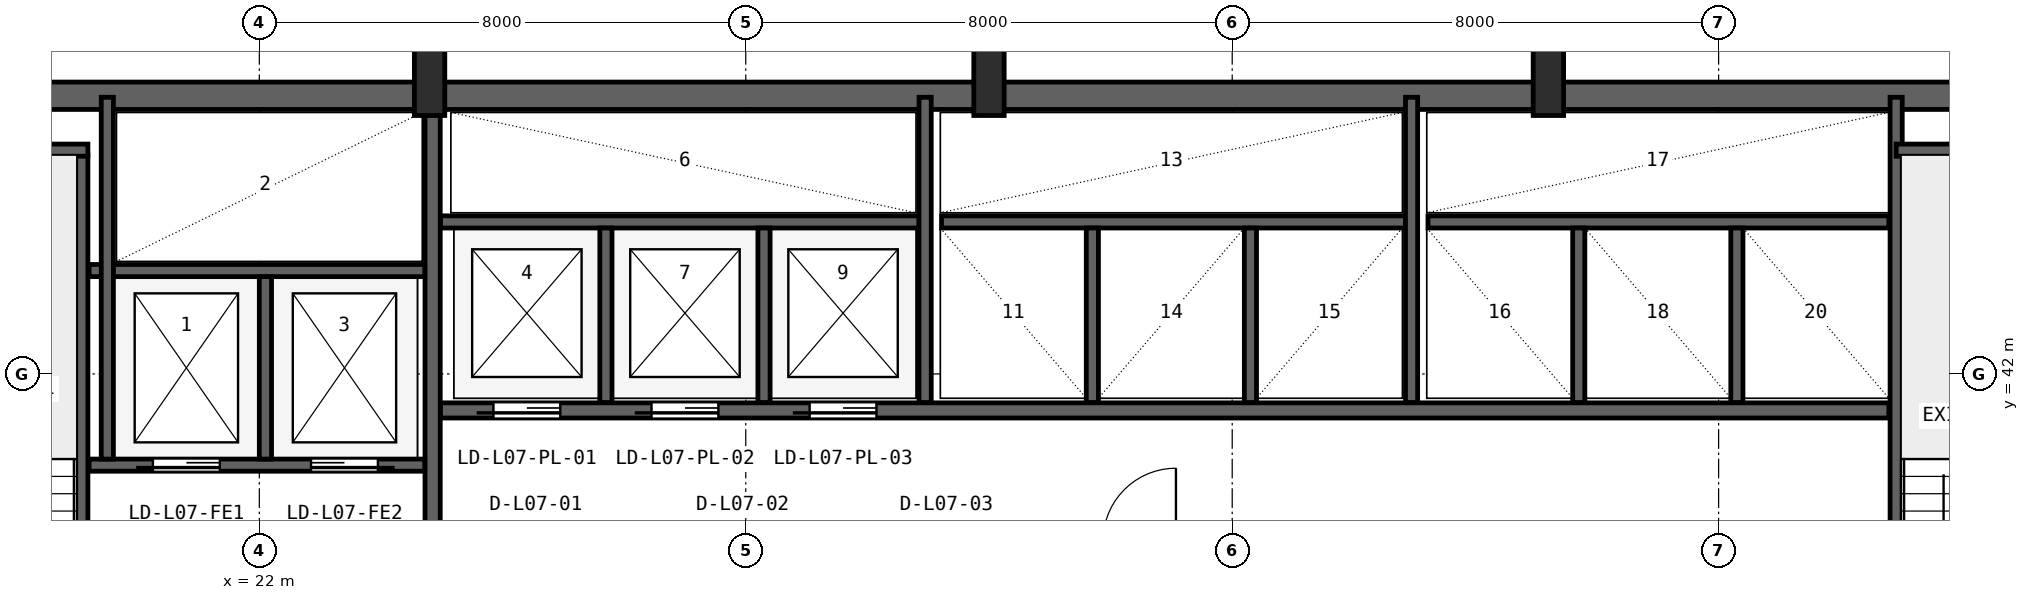
"""IFC4 building model, lengths in metres.
Left out: names, types, materials, properties, quantities, classifications, styles, units other than length and angle.
Written with IfcOpenShell. Run it as: python <this file> out.ifc"""

import sys

from ifc_helpers import new_model, si_unit, direction, frame, frame_2d, origin, origin_2d, place, context, subcontext, project, spatial, rectangle, i_section, extrude, source, transform, mapped, element, fill, save


model = new_model("IFC4")
c1 = context("Model", 3, precision=1e-05, world=origin(), true_north=direction((0.0, 1.0)))
c2 = subcontext(c1, "Body", "Model", "MODEL_VIEW")
j1 = project(units=[si_unit("LENGTHUNIT", "METRE"), si_unit("PLANEANGLEUNIT", "RADIAN")], contexts=[c1])
p1 = place(None, origin())
s1 = spatial("IfcSite", under=j1, at=p1, CompositionType="ELEMENT")
p2 = place(p1, origin())
s2 = spatial("IfcBuilding", under=s1, at=p2, CompositionType="ELEMENT")
p3 = place(p2, frame((0.0, 0.0, 35.4)))
s3 = spatial("IfcBuildingStorey", under=s2, at=p3, CompositionType="ELEMENT", Elevation=35.4)
p4 = place(p3, frame((15.6, 46.575, 0.0), z_axis=(0.0, 0.0, 1.0), x_axis=(1.0, 0.0, 0.0)))
e1 = element("IfcWall", 1, at=p4, inside=s3, PredefinedType="SHEAR", context=c2, shape_type="SweptSolid", body=[
    extrude(rectangle(XDim=36.8, YDim=0.45, at=frame_2d((18.4, 0.0))), origin(), (0.0, 0.0, 1.0), 3.65),
])
m1 = source(origin(), c2, "Body", "SweptSolid", [
    extrude(i_section(OverallWidth=0.5, OverallDepth=1.1, WebThickness=0.018, FlangeThickness=0.032, FilletRadius=0.018, at=origin_2d()), origin(), (0.0, 0.0, 1.0), 3.9),
])
for number, where, z_axis, x_axis in (
    (2, (24.8, 46.8, 0.0), (0.0, 0.0, 1.0), (1.0, 0.0, 0.0)),
    (3, (34.0, 46.8, 0.0), (0.0, 0.0, 1.0), (1.0, 0.0, 0.0)),
    (4, (43.2, 46.8, 0.0), (0.0, 0.0, 1.0), (1.0, 0.0, 0.0)),
):
    element("IfcColumn", number, at=place(p3, frame(where, z_axis=z_axis, x_axis=x_axis)), inside=s3, PredefinedType="COLUMN", context=c2, shape_type="MappedRepresentation", body=[
        mapped(m1, transform((0.0, 0.0, 0.0), x_axis=(1.0, 0.0, 0.0), y_axis=(0.0, 1.0, 0.0), z_axis=(0.0, 0.0, 1.0), scale=1.0)),
    ])
p5 = place(p3, frame((19.08, 35.95, 0.0), z_axis=(0.0, 0.0, 1.0), x_axis=(0.0, 1.0, 0.0)))
e5 = element("IfcWall", 5, at=p5, inside=s3, PredefinedType="SHEAR", context=c2, shape_type="SweptSolid", body=[
    extrude(rectangle(XDim=9.65, YDim=0.2, at=frame_2d((4.825, 0.0))), origin(), (0.0, 0.0, 1.0), 3.65),
])
p6 = place(p5, frame((0.25, 0.0, 0.0)))
e6 = element("IfcOpeningElement", 6, at=p6, cuts=e5, PredefinedType="OPENING", context=c2, shape_type="SweptSolid", body=[
    extrude(rectangle(XDim=0.95, YDim=2.1, at=frame_2d((0.475, 1.05))), frame((0.0, 0.11, 0.0), z_axis=(0.0, -1.0, 0.0), x_axis=(1.0, 0.0, 0.0)), (0.0, 0.0, 1.0), 0.22),
])
p7 = place(p3, frame((15.95, 45.68, 0.0), z_axis=(0.0, 0.0, 1.0), x_axis=(1.0, 0.0, 0.0)))
e7 = element("IfcWall", 7, at=p7, inside=s3, PredefinedType="SHEAR", context=c2, shape_type="SweptSolid", body=[
    extrude(rectangle(XDim=3.23, YDim=0.2, at=frame_2d((1.615, 0.0))), origin(), (0.0, 0.0, 1.0), 3.65),
])
p8 = place(p3, frame((24.85, 36.05, 0.0), z_axis=(0.0, 0.0, 1.0), x_axis=(0.0, 1.0, 0.0)))
e8 = element("IfcWall", 8, at=p8, inside=s3, PredefinedType="SHEAR", context=c2, shape_type="SweptSolid", body=[
    extrude(rectangle(XDim=10.45, YDim=0.25, at=frame_2d((5.225, 0.0))), origin(), (0.0, 0.0, 1.0), 3.65),
])
p9 = place(p3, frame((19.2, 40.5, 0.0), z_axis=(0.0, 0.0, 1.0), x_axis=(1.0, 0.0, 0.0)))
e9 = element("IfcWall", 9, at=p9, inside=s3, PredefinedType="SHEAR", context=c2, shape_type="SweptSolid", body=[
    extrude(rectangle(XDim=5.52, YDim=0.2, at=frame_2d((2.76, 0.0))), origin(), (0.0, 0.0, 1.0), 3.65),
])
p10 = place(p9, frame((1.05, 0.0, 0.0)))
e10 = element("IfcOpeningElement", 10, at=p10, cuts=e9, PredefinedType="OPENING", context=c2, shape_type="SweptSolid", body=[
    extrude(rectangle(XDim=1.1, YDim=2.18, at=frame_2d((0.55, 1.09))), frame((0.0, 0.11, 0.0), z_axis=(0.0, -1.0, 0.0), x_axis=(1.0, 0.0, 0.0)), (0.0, 0.0, 1.0), 0.22),
])
p11 = place(p9, frame((3.65, 0.0, 0.0)))
e11 = element("IfcOpeningElement", 11, at=p11, cuts=e9, PredefinedType="OPENING", context=c2, shape_type="SweptSolid", body=[
    extrude(rectangle(XDim=1.1, YDim=2.18, at=frame_2d((0.55, 1.09))), frame((0.0, 0.11, 0.0), z_axis=(0.0, -1.0, 0.0), x_axis=(1.0, 0.0, 0.0)), (0.0, 0.0, 1.0), 0.22),
])
p12 = place(p3, frame((19.2, 43.7, 0.0), z_axis=(0.0, 0.0, 1.0), x_axis=(1.0, 0.0, 0.0)))
e12 = element("IfcWall", 12, at=p12, inside=s3, PredefinedType="SHEAR", context=c2, shape_type="SweptSolid", body=[
    extrude(rectangle(XDim=5.52, YDim=0.2, at=frame_2d((2.76, 0.0))), origin(), (0.0, 0.0, 1.0), 3.65),
])
p13 = place(p3, frame((22.1, 40.6, 0.0), z_axis=(0.0, 0.0, 1.0), x_axis=(0.0, 1.0, 0.0)))
e13 = element("IfcWall", 13, at=p13, inside=s3, PredefinedType="SHEAR", context=c2, shape_type="SweptSolid", body=[
    extrude(rectangle(XDim=3.0, YDim=0.2, at=frame_2d((1.5, 0.0))), origin(), (0.0, 0.0, 1.0), 3.65),
])
p14 = place(p3, frame((19.5, 40.6, 0.0), z_axis=(0.0, 0.0, 1.0), x_axis=(0.0, 1.0, 0.0)))
e14 = element("IfcWall", 14, at=p14, inside=s3, PredefinedType="SHEAR", context=c2, shape_type="SweptSolid", body=[
    extrude(rectangle(XDim=5.95, YDim=0.2, at=frame_2d((2.975, 0.0))), origin(), (0.0, 0.0, 1.0), 3.65),
])
p15 = place(p3, frame((48.92, 36.05, 0.0), z_axis=(0.0, 0.0, 1.0), x_axis=(0.0, 1.0, 0.0)))
e15 = element("IfcWall", 15, at=p15, inside=s3, PredefinedType="SHEAR", context=c2, shape_type="SweptSolid", body=[
    extrude(rectangle(XDim=10.5, YDim=0.2, at=frame_2d((5.25, 0.0))), origin(), (0.0, 0.0, 1.0), 3.65),
])
p16 = place(p3, frame((48.92, 45.68, 0.0), z_axis=(0.0, 0.0, 1.0), x_axis=(1.0, 0.0, 0.0)))
e16 = element("IfcWall", 16, at=p16, inside=s3, PredefinedType="SHEAR", context=c2, shape_type="SweptSolid", body=[
    extrude(rectangle(XDim=3.18, YDim=0.2, at=frame_2d((1.59, 0.0))), origin(), (0.0, 0.0, 1.0), 3.65),
])
p17 = place(p3, frame((24.98, 41.4, 0.0), z_axis=(0.0, 0.0, 1.0), x_axis=(1.0, 0.0, 0.0)))
e17 = element("IfcWall", 17, at=p17, inside=s3, PredefinedType="SHEAR", context=c2, shape_type="SweptSolid", body=[
    extrude(rectangle(XDim=23.82, YDim=0.25, at=frame_2d((11.91, 0.0))), origin(), (0.0, 0.0, 1.0), 3.65),
])
p18 = place(p17, frame((0.87, 0.0, 0.0)))
e18 = element("IfcOpeningElement", 18, at=p18, cuts=e17, PredefinedType="OPENING", context=c2, shape_type="SweptSolid", body=[
    extrude(rectangle(XDim=1.1, YDim=2.18, at=frame_2d((0.55, 1.09))), frame((0.0, 0.135, 0.0), z_axis=(0.0, -1.0, 0.0), x_axis=(1.0, 0.0, 0.0)), (0.0, 0.0, 1.0), 0.27),
])
p19 = place(p17, frame((3.47, 0.0, 0.0)))
e19 = element("IfcOpeningElement", 19, at=p19, cuts=e17, PredefinedType="OPENING", context=c2, shape_type="SweptSolid", body=[
    extrude(rectangle(XDim=1.1, YDim=2.18, at=frame_2d((0.55, 1.09))), frame((0.0, 0.135, 0.0), z_axis=(0.0, -1.0, 0.0), x_axis=(1.0, 0.0, 0.0)), (0.0, 0.0, 1.0), 0.27),
])
p20 = place(p17, frame((6.07, 0.0, 0.0)))
e20 = element("IfcOpeningElement", 20, at=p20, cuts=e17, PredefinedType="OPENING", context=c2, shape_type="SweptSolid", body=[
    extrude(rectangle(XDim=1.1, YDim=2.18, at=frame_2d((0.55, 1.09))), frame((0.0, 0.135, 0.0), z_axis=(0.0, -1.0, 0.0), x_axis=(1.0, 0.0, 0.0)), (0.0, 0.0, 1.0), 0.27),
])
p21 = place(p3, frame((24.98, 44.5, 0.0), z_axis=(0.0, 0.0, 1.0), x_axis=(1.0, 0.0, 0.0)))
e21 = element("IfcWall", 21, at=p21, inside=s3, PredefinedType="SHEAR", context=c2, shape_type="SweptSolid", body=[
    extrude(rectangle(XDim=7.87, YDim=0.2, at=frame_2d((3.935, 0.0))), origin(), (0.0, 0.0, 1.0), 3.65),
])
for number, where, z_axis, x_axis in (
    (22, (27.7, 41.53, 0.0), (0.0, 0.0, 1.0), (0.0, 1.0, 0.0)),
    (23, (30.3, 41.53, 0.0), (0.0, 0.0, 1.0), (0.0, 1.0, 0.0)),
):
    element("IfcWall", number, at=place(p3, frame(where, z_axis=z_axis, x_axis=x_axis)), inside=s3, PredefinedType="SHEAR", context=c2, shape_type="SweptSolid", body=[
        extrude(rectangle(XDim=2.87, YDim=0.2, at=frame_2d((1.435, 0.0))), origin(), (0.0, 0.0, 1.0), 3.65),
    ])
p22 = place(p3, frame((32.95, 41.53, 0.0), z_axis=(0.0, 0.0, 1.0), x_axis=(0.0, 1.0, 0.0)))
e24 = element("IfcWall", 24, at=p22, inside=s3, PredefinedType="SHEAR", context=c2, shape_type="SweptSolid", body=[
    extrude(rectangle(XDim=5.02, YDim=0.2, at=frame_2d((2.51, 0.0))), origin(), (0.0, 0.0, 1.0), 3.65),
])
p23 = place(p3, frame((33.22, 44.5, 0.0), z_axis=(0.0, 0.0, 1.0), x_axis=(1.0, 0.0, 0.0)))
e25 = element("IfcWall", 25, at=p23, inside=s3, PredefinedType="SHEAR", context=c2, shape_type="SweptSolid", body=[
    extrude(rectangle(XDim=7.63, YDim=0.2, at=frame_2d((3.815, 0.0))), origin(), (0.0, 0.0, 1.0), 3.65),
])
for number, where, z_axis, x_axis in (
    (26, (35.7, 41.53, 0.0), (0.0, 0.0, 1.0), (0.0, 1.0, 0.0)),
    (27, (38.3, 41.53, 0.0), (0.0, 0.0, 1.0), (0.0, 1.0, 0.0)),
):
    element("IfcWall", number, at=place(p3, frame(where, z_axis=z_axis, x_axis=x_axis)), inside=s3, PredefinedType="SHEAR", context=c2, shape_type="SweptSolid", body=[
        extrude(rectangle(XDim=2.87, YDim=0.2, at=frame_2d((1.435, 0.0))), origin(), (0.0, 0.0, 1.0), 3.65),
    ])
p24 = place(p3, frame((40.95, 41.53, 0.0), z_axis=(0.0, 0.0, 1.0), x_axis=(0.0, 1.0, 0.0)))
e28 = element("IfcWall", 28, at=p24, inside=s3, PredefinedType="SHEAR", context=c2, shape_type="SweptSolid", body=[
    extrude(rectangle(XDim=5.02, YDim=0.2, at=frame_2d((2.51, 0.0))), origin(), (0.0, 0.0, 1.0), 3.65),
])
p25 = place(p3, frame((41.22, 44.5, 0.0), z_axis=(0.0, 0.0, 1.0), x_axis=(1.0, 0.0, 0.0)))
e29 = element("IfcWall", 29, at=p25, inside=s3, PredefinedType="SHEAR", context=c2, shape_type="SweptSolid", body=[
    extrude(rectangle(XDim=7.58, YDim=0.2, at=frame_2d((3.79, 0.0))), origin(), (0.0, 0.0, 1.0), 3.65),
])
for number, where, z_axis, x_axis in (
    (30, (43.7, 41.53, 0.0), (0.0, 0.0, 1.0), (0.0, 1.0, 0.0)),
    (31, (46.3, 41.53, 0.0), (0.0, 0.0, 1.0), (0.0, 1.0, 0.0)),
):
    element("IfcWall", number, at=place(p3, frame(where, z_axis=z_axis, x_axis=x_axis)), inside=s3, PredefinedType="SHEAR", context=c2, shape_type="SweptSolid", body=[
        extrude(rectangle(XDim=2.87, YDim=0.2, at=frame_2d((1.435, 0.0))), origin(), (0.0, 0.0, 1.0), 3.65),
    ])
m2 = source(origin(), c2, "Body", "SweptSolid", [
    extrude(rectangle(XDim=1.1, YDim=2.18, at=frame_2d((0.55, 1.09))), frame((0.0, 0.025, 0.0), z_axis=(0.0, -1.0, 0.0), x_axis=(1.0, 0.0, 0.0)), (0.0, 0.0, 1.0), 0.05),
])
p26 = place(p10, frame((1.1, 0.0, 0.0), z_axis=(0.0, 0.0, 1.0), x_axis=(-1.0, 0.0, 0.0)))
e32 = element("IfcDoor", 32, at=p26, inside=s3, OperationType="SLIDING_TO_LEFT", PredefinedType="DOOR", context=c2, shape_type="MappedRepresentation", body=[
    mapped(m2, transform((0.0, 0.0, 0.0), x_axis=(1.0, 0.0, 0.0), y_axis=(0.0, 1.0, 0.0), z_axis=(0.0, 0.0, 1.0), scale=1.0)),
])
fill(e10, e32)
p27 = place(p11, frame((1.1, 0.0, 0.0), z_axis=(0.0, 0.0, 1.0), x_axis=(-1.0, 0.0, 0.0)))
e33 = element("IfcDoor", 33, at=p27, inside=s3, OperationType="SLIDING_TO_RIGHT", PredefinedType="DOOR", context=c2, shape_type="MappedRepresentation", body=[
    mapped(m2, transform((0.0, 0.0, 0.0), x_axis=(1.0, 0.0, 0.0), y_axis=(0.0, 1.0, 0.0), z_axis=(0.0, 0.0, 1.0), scale=1.0)),
])
fill(e11, e33)
p28 = place(p18, frame((1.1, 0.0, 0.0), z_axis=(0.0, 0.0, 1.0), x_axis=(-1.0, 0.0, 0.0)))
e34 = element("IfcDoor", 34, at=p28, inside=s3, OperationType="SLIDING_TO_LEFT", PredefinedType="DOOR", context=c2, shape_type="MappedRepresentation", body=[
    mapped(m2, transform((0.0, 0.0, 0.0), x_axis=(1.0, 0.0, 0.0), y_axis=(0.0, 1.0, 0.0), z_axis=(0.0, 0.0, 1.0), scale=1.0)),
])
fill(e18, e34)
p29 = place(p19, frame((1.1, 0.0, 0.0), z_axis=(0.0, 0.0, 1.0), x_axis=(-1.0, 0.0, 0.0)))
e35 = element("IfcDoor", 35, at=p29, inside=s3, OperationType="SLIDING_TO_LEFT", PredefinedType="DOOR", context=c2, shape_type="MappedRepresentation", body=[
    mapped(m2, transform((0.0, 0.0, 0.0), x_axis=(1.0, 0.0, 0.0), y_axis=(0.0, 1.0, 0.0), z_axis=(0.0, 0.0, 1.0), scale=1.0)),
])
fill(e19, e35)
p30 = place(p20, frame((1.1, 0.0, 0.0), z_axis=(0.0, 0.0, 1.0), x_axis=(-1.0, 0.0, 0.0)))
e36 = element("IfcDoor", 36, at=p30, inside=s3, OperationType="SLIDING_TO_LEFT", PredefinedType="DOOR", context=c2, shape_type="MappedRepresentation", body=[
    mapped(m2, transform((0.0, 0.0, 0.0), x_axis=(1.0, 0.0, 0.0), y_axis=(0.0, 1.0, 0.0), z_axis=(0.0, 0.0, 1.0), scale=1.0)),
])
fill(e20, e36)
save(model, sys.argv[1])
